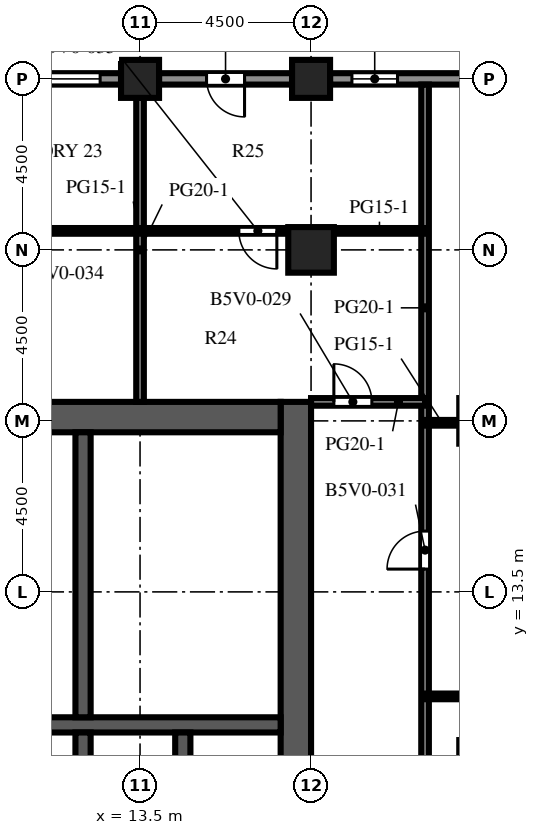
"""IFC4 building model, lengths in metres.
Left out: names, types, materials, properties, quantities, classifications, styles, units other than length and angle.
Written with IfcOpenShell. Run it as: python <this file> out.ifc"""

import sys

from ifc_helpers import new_model, si_unit, direction, frame, frame_2d, origin, origin_2d, place, context, subcontext, project, spatial, rectangle, extrude, element, fill, save


model = new_model("IFC4")
c1 = context("Model", 3, precision=1e-05, world=origin(), true_north=direction((0.0, 1.0)))
c2 = subcontext(c1, "Body", "Model", "MODEL_VIEW")
j1 = project(units=[si_unit("LENGTHUNIT", "METRE"), si_unit("PLANEANGLEUNIT", "RADIAN")], contexts=[c1])
p1 = place(None, origin())
s1 = spatial("IfcSite", under=j1, at=p1, CompositionType="ELEMENT")
p2 = place(p1, origin())
s2 = spatial("IfcBuilding", under=s1, at=p2, CompositionType="ELEMENT")
p3 = place(p2, frame((0.0, 0.0, 160.9)))
s3 = spatial("IfcBuildingStorey", under=s2, at=p3, CompositionType="ELEMENT", Elevation=160.9)
for number, where, z_axis, x_axis in (
    (1, (13.5, 27.0, 0.0), (0.0, 0.0, 1.0), (1.0, 0.0, 0.0)),
    (2, (18.0, 27.0, 0.0), (0.0, 0.0, 1.0), (1.0, 0.0, 0.0)),
):
    element("IfcColumn", number, at=place(p3, frame(where, z_axis=z_axis, x_axis=x_axis)), inside=s3, PredefinedType="COLUMN", context=c2, shape_type="SweptSolid", body=[
        extrude(rectangle(XDim=1.0, YDim=1.0, at=origin_2d()), origin(), (0.0, 0.0, 1.0), 4.1),
    ])
p4 = place(p3, frame((18.0, 22.5, 0.0), z_axis=(0.0, 0.0, 1.0), x_axis=(1.0, 0.0, 0.0)))
e3 = element("IfcColumn", 3, at=p4, inside=s3, PredefinedType="COLUMN", context=c2, shape_type="SweptSolid", body=[
    extrude(rectangle(XDim=1.2, YDim=1.2, at=origin_2d()), origin(), (0.0, 0.0, 1.0), 4.1),
])
p5 = place(p3, frame((17.6, -9.0, 0.0), z_axis=(0.0, 0.0, 1.0), x_axis=(0.0, 1.0, 0.0)))
e4 = element("IfcWall", 4, at=p5, inside=s3, PredefinedType="SHEAR", context=c2, shape_type="SweptSolid", body=[
    extrude(rectangle(XDim=27.5, YDim=0.8, at=frame_2d((13.75, 0.0))), origin(), (0.0, 0.0, 1.0), 4.1),
])
p6 = place(p5, frame((12.55, 0.0, 0.0)))
e5 = element("IfcOpeningElement", 5, at=p6, cuts=e4, PredefinedType="OPENING", context=c2, shape_type="SweptSolid", body=[
    extrude(rectangle(XDim=2.4, YDim=2.4, at=frame_2d((1.2, 1.2))), frame((0.0, 0.41, 0.0), z_axis=(0.0, -1.0, 0.0), x_axis=(1.0, 0.0, 0.0)), (0.0, 0.0, 1.0), 0.82),
])
p7 = place(p5, frame((6.825, 0.0, 0.0)))
e6 = element("IfcOpeningElement", 6, at=p7, cuts=e4, PredefinedType="OPENING", context=c2, shape_type="SweptSolid", body=[
    extrude(rectangle(XDim=1.2, YDim=2.1, at=frame_2d((0.6, 1.05))), frame((0.0, 0.41, 0.0), z_axis=(0.0, -1.0, 0.0), x_axis=(1.0, 0.0, 0.0)), (0.0, 0.0, 1.0), 0.82),
])
p8 = place(p5, frame((19.475, 0.0, 0.0)))
e7 = element("IfcOpeningElement", 7, at=p8, cuts=e4, PredefinedType="OPENING", context=c2, shape_type="SweptSolid", body=[
    extrude(rectangle(XDim=1.2, YDim=2.1, at=frame_2d((0.6, 1.05))), frame((0.0, 0.41, 0.0), z_axis=(0.0, -1.0, 0.0), x_axis=(1.0, 0.0, 0.0)), (0.0, 0.0, 1.0), 0.82),
])
p9 = place(p3, frame((6.8, 18.1, 0.0), z_axis=(0.0, 0.0, 1.0), x_axis=(1.0, 0.0, 0.0)))
e8 = element("IfcWall", 8, at=p9, inside=s3, PredefinedType="SHEAR", context=c2, shape_type="SweptSolid", body=[
    extrude(rectangle(XDim=10.4, YDim=0.8, at=frame_2d((5.2, 0.0))), origin(), (0.0, 0.0, 1.0), 4.1),
])
p10 = place(p3, frame((6.8, 10.0, 0.0), z_axis=(0.0, 0.0, 1.0), x_axis=(1.0, 0.0, 0.0)))
e9 = element("IfcWall", 9, at=p10, inside=s3, PredefinedType="SHEAR", context=c2, shape_type="SweptSolid", body=[
    extrude(rectangle(XDim=10.4, YDim=0.4, at=frame_2d((5.2, 0.0))), origin(), (0.0, 0.0, 1.0), 4.1),
])
for number, where, z_axis, x_axis in (
    (10, (12.0, 6.9, 0.0), (0.0, 0.0, 1.0), (0.0, 1.0, 0.0)),
    (11, (14.625, 6.9, 0.0), (0.0, 0.0, 1.0), (0.0, 1.0, 0.0)),
):
    element("IfcWall", number, at=place(p3, frame(where, z_axis=z_axis, x_axis=x_axis)), inside=s3, PredefinedType="SHEAR", context=c2, shape_type="SweptSolid", body=[
        extrude(rectangle(XDim=2.9, YDim=0.4, at=frame_2d((1.45, 0.0))), origin(), (0.0, 0.0, 1.0), 4.1),
    ])
p11 = place(p3, frame((12.0, 10.2, 0.0), z_axis=(0.0, 0.0, 1.0), x_axis=(0.0, 1.0, 0.0)))
e12 = element("IfcWall", 12, at=p11, inside=s3, PredefinedType="SHEAR", context=c2, shape_type="SweptSolid", body=[
    extrude(rectangle(XDim=7.5, YDim=0.4, at=frame_2d((3.75, 0.0))), origin(), (0.0, 0.0, 1.0), 4.1),
])
p12 = place(p3, frame((18.5, 27.0, 0.0), z_axis=(0.0, 0.0, 1.0), x_axis=(1.0, 0.0, 0.0)))
e13 = element("IfcWall", 13, at=p12, inside=s3, PredefinedType="SOLIDWALL", context=c2, shape_type="SweptSolid", body=[
    extrude(rectangle(XDim=3.5, YDim=0.3, at=frame_2d((1.75, 0.0))), origin(), (0.0, 0.0, 1.0), 2.85),
])
p13 = place(p12, frame((0.575, 0.0, 0.8)))
e14 = element("IfcOpeningElement", 14, at=p13, cuts=e13, PredefinedType="OPENING", context=c2, shape_type="SweptSolid", body=[
    extrude(rectangle(XDim=1.2, YDim=1.7, at=frame_2d((0.6, 0.85))), frame((0.0, 0.16, 0.0), z_axis=(0.0, -1.0, 0.0), x_axis=(1.0, 0.0, 0.0)), (0.0, 0.0, 1.0), 0.32),
])
p14 = place(p3, frame((14.0, 27.0, 0.0), z_axis=(0.0, 0.0, 1.0), x_axis=(1.0, 0.0, 0.0)))
e15 = element("IfcWall", 15, at=p14, inside=s3, PredefinedType="SOLIDWALL", context=c2, shape_type="SweptSolid", body=[
    extrude(rectangle(XDim=3.5, YDim=0.3, at=frame_2d((1.75, 0.0))), origin(), (0.0, 0.0, 1.0), 2.85),
])
p15 = place(p14, frame((1.25, 0.0, 0.0)))
e16 = element("IfcOpeningElement", 16, at=p15, cuts=e15, PredefinedType="OPENING", context=c2, shape_type="SweptSolid", body=[
    extrude(rectangle(XDim=1.0, YDim=2.2, at=frame_2d((0.5, 1.1))), frame((0.0, 0.16, 0.0), z_axis=(0.0, -1.0, 0.0), x_axis=(1.0, 0.0, 0.0)), (0.0, 0.0, 1.0), 0.32),
])
p16 = place(p3, frame((9.5, 27.0, 0.0), z_axis=(0.0, 0.0, 1.0), x_axis=(1.0, 0.0, 0.0)))
e17 = element("IfcWall", 17, at=p16, inside=s3, PredefinedType="SOLIDWALL", context=c2, shape_type="SweptSolid", body=[
    extrude(rectangle(XDim=3.5, YDim=0.3, at=frame_2d((1.75, 0.0))), origin(), (0.0, 0.0, 1.0), 2.85),
])
p17 = place(p16, frame((0.55, 0.0, 0.8)))
e18 = element("IfcOpeningElement", 18, at=p17, cuts=e17, PredefinedType="OPENING", context=c2, shape_type="SweptSolid", body=[
    extrude(rectangle(XDim=2.4, YDim=1.7, at=frame_2d((1.2, 0.85))), frame((0.0, 0.16, 0.0), z_axis=(0.0, -1.0, 0.0), x_axis=(1.0, 0.0, 0.0)), (0.0, 0.0, 1.0), 0.32),
])
for number, where, z_axis, x_axis in (
    (19, (6.8, 11.7, 0.0), (0.0, 0.0, 1.0), (1.0, 0.0, 0.0)),
    (20, (6.8, 13.575, 0.0), (0.0, 0.0, 1.0), (1.0, 0.0, 0.0)),
    (21, (6.8, 15.825, 0.0), (0.0, 0.0, 1.0), (1.0, 0.0, 0.0)),
):
    element("IfcWall", number, at=place(p3, frame(where, z_axis=z_axis, x_axis=x_axis)), inside=s3, PredefinedType="PARTITIONING", context=c2, shape_type="SweptSolid", body=[
        extrude(rectangle(XDim=5.0, YDim=0.1, at=frame_2d((2.5, 0.0))), origin(), (0.0, 0.0, 1.0), 3.65),
    ])
p18 = place(p3, frame((13.5, 18.5, 0.0), z_axis=(0.0, 0.0, 1.0), x_axis=(0.0, 1.0, 0.0)))
e22 = element("IfcWall", 22, at=p18, inside=s3, PredefinedType="PARTITIONING", context=c2, shape_type="SweptSolid", body=[
    extrude(rectangle(XDim=8.0, YDim=0.2, at=frame_2d((4.0, 0.0))), origin(), (0.0, 0.0, 1.0), 3.65),
])
p19 = place(p3, frame((21.0, 26.85, 0.0), z_axis=(0.0, 0.0, 1.0), x_axis=(0.0, -1.0, 0.0)))
e23 = element("IfcWall", 23, at=p19, inside=s3, PredefinedType="PARTITIONING", context=c2, shape_type="SweptSolid", body=[
    extrude(rectangle(XDim=20.6, YDim=0.2, at=frame_2d((10.3, 0.0))), origin(), (0.0, 0.0, 1.0), 3.65),
])
p20 = place(p19, frame((11.75, 0.0, 0.0)))
e24 = element("IfcOpeningElement", 24, at=p20, cuts=e23, PredefinedType="OPENING", context=c2, shape_type="SweptSolid", body=[
    extrude(rectangle(XDim=1.0, YDim=2.1, at=frame_2d((0.5, 1.05))), frame((0.0, 0.11, 0.0), z_axis=(0.0, -1.0, 0.0), x_axis=(1.0, 0.0, 0.0)), (0.0, 0.0, 1.0), 0.22),
])
p21 = place(p3, frame((26.85, 10.75, 0.0), z_axis=(0.0, 0.0, 1.0), x_axis=(-1.0, 0.0, 0.0)))
e25 = element("IfcWall", 25, at=p21, inside=s3, PredefinedType="PARTITIONING", context=c2, shape_type="SweptSolid", body=[
    extrude(rectangle(XDim=5.85, YDim=0.15, at=frame_2d((2.925, 0.0))), origin(), (0.0, 0.0, 1.0), 3.65),
])
p22 = place(p21, frame((2.5, 0.0, 0.0)))
e26 = element("IfcOpeningElement", 26, at=p22, cuts=e25, PredefinedType="OPENING", context=c2, shape_type="SweptSolid", body=[
    extrude(rectangle(XDim=1.0, YDim=2.1, at=frame_2d((0.5, 1.05))), frame((0.0, 0.085, 0.0), z_axis=(0.0, -1.0, 0.0), x_axis=(1.0, 0.0, 0.0)), (0.0, 0.0, 1.0), 0.17),
])
p23 = place(p3, frame((21.0, 17.95, 0.0), z_axis=(0.0, 0.0, 1.0), x_axis=(1.0, 0.0, 0.0)))
e27 = element("IfcWall", 27, at=p23, inside=s3, PredefinedType="PARTITIONING", context=c2, shape_type="SweptSolid", body=[
    extrude(rectangle(XDim=0.9, YDim=0.15, at=frame_2d((0.45, 0.0))), origin(), (0.0, 0.0, 1.0), 3.65),
])
p24 = place(p3, frame((18.0, 18.5, 0.0), z_axis=(0.0, 0.0, 1.0), x_axis=(1.0, 0.0, 0.0)))
e28 = element("IfcWall", 28, at=p24, inside=s3, PredefinedType="PARTITIONING", context=c2, shape_type="SweptSolid", body=[
    extrude(rectangle(XDim=3.0, YDim=0.2, at=frame_2d((1.5, 0.0))), origin(), (0.0, 0.0, 1.0), 3.65),
])
p25 = place(p24, frame((0.6, 0.0, 0.0)))
e29 = element("IfcOpeningElement", 29, at=p25, cuts=e28, PredefinedType="OPENING", context=c2, shape_type="SweptSolid", body=[
    extrude(rectangle(XDim=1.0, YDim=2.1, at=frame_2d((0.5, 1.05))), frame((0.0, 0.11, 0.0), z_axis=(0.0, -1.0, 0.0), x_axis=(1.0, 0.0, 0.0)), (0.0, 0.0, 1.0), 0.22),
])
p26 = place(p3, frame((9.6, 23.0, 0.0), z_axis=(0.0, 0.0, 1.0), x_axis=(1.0, 0.0, 0.0)))
e30 = element("IfcWall", 30, at=p26, inside=s3, PredefinedType="PARTITIONING", context=c2, shape_type="SweptSolid", body=[
    extrude(rectangle(XDim=7.8, YDim=0.15, at=frame_2d((3.9, 0.0))), origin(), (0.0, 0.0, 1.0), 3.65),
])
p27 = place(p26, frame((0.25, 0.0, 0.0)))
e31 = element("IfcOpeningElement", 31, at=p27, cuts=e30, PredefinedType="OPENING", context=c2, shape_type="SweptSolid", body=[
    extrude(rectangle(XDim=1.0, YDim=2.1, at=frame_2d((0.5, 1.05))), frame((0.0, 0.085, 0.0), z_axis=(0.0, -1.0, 0.0), x_axis=(1.0, 0.0, 0.0)), (0.0, 0.0, 1.0), 0.17),
])
p28 = place(p26, frame((6.5, 0.0, 0.0)))
e32 = element("IfcOpeningElement", 32, at=p28, cuts=e30, PredefinedType="OPENING", context=c2, shape_type="SweptSolid", body=[
    extrude(rectangle(XDim=1.0, YDim=2.1, at=frame_2d((0.5, 1.05))), frame((0.0, 0.085, 0.0), z_axis=(0.0, -1.0, 0.0), x_axis=(1.0, 0.0, 0.0)), (0.0, 0.0, 1.0), 0.17),
])
p29 = place(p3, frame((18.6, 23.0, 0.0), z_axis=(0.0, 0.0, 1.0), x_axis=(1.0, 0.0, 0.0)))
e33 = element("IfcWall", 33, at=p29, inside=s3, PredefinedType="PARTITIONING", context=c2, shape_type="SweptSolid", body=[
    extrude(rectangle(XDim=2.4, YDim=0.15, at=frame_2d((1.2, 0.0))), origin(), (0.0, 0.0, 1.0), 3.65),
])
p30 = place(p13, origin())
e34 = element("IfcWindow", 34, at=p30, inside=s3, PartitioningType="SINGLE_PANEL", PredefinedType="WINDOW", context=c2, shape_type="SweptSolid", body=[
    extrude(rectangle(XDim=1.2, YDim=1.7, at=frame_2d((0.6, 0.85))), frame((0.0, 0.03, 0.0), z_axis=(0.0, -1.0, 0.0), x_axis=(1.0, 0.0, 0.0)), (0.0, 0.0, 1.0), 0.06),
])
fill(e14, e34)
p31 = place(p15, origin())
e35 = element("IfcDoor", 35, at=p31, inside=s3, OperationType="SINGLE_SWING_RIGHT", PredefinedType="DOOR", context=c2, shape_type="SweptSolid", body=[
    extrude(rectangle(XDim=1.0, YDim=2.2, at=frame_2d((0.5, 1.1))), frame((0.0, 0.025, 0.0), z_axis=(0.0, -1.0, 0.0), x_axis=(1.0, 0.0, 0.0)), (0.0, 0.0, 1.0), 0.05),
])
fill(e16, e35)
p32 = place(p17, origin())
e36 = element("IfcWindow", 36, at=p32, inside=s3, PartitioningType="SINGLE_PANEL", PredefinedType="WINDOW", context=c2, shape_type="SweptSolid", body=[
    extrude(rectangle(XDim=2.4, YDim=1.7, at=frame_2d((1.2, 0.85))), frame((0.0, 0.03, 0.0), z_axis=(0.0, -1.0, 0.0), x_axis=(1.0, 0.0, 0.0)), (0.0, 0.0, 1.0), 0.06),
])
fill(e18, e36)
p33 = place(p8, frame((1.2, 0.0, 0.0), z_axis=(0.0, 0.0, 1.0), x_axis=(-1.0, 0.0, 0.0)))
e37 = element("IfcDoor", 37, at=p33, inside=s3, OperationType="SINGLE_SWING_LEFT", PredefinedType="DOOR", context=c2, shape_type="SweptSolid", body=[
    extrude(rectangle(XDim=1.2, YDim=2.1, at=frame_2d((0.6, 1.05))), frame((0.0, 0.025, 0.0), z_axis=(0.0, -1.0, 0.0), x_axis=(1.0, 0.0, 0.0)), (0.0, 0.0, 1.0), 0.05),
])
fill(e7, e37)
p34 = place(p25, origin())
e38 = element("IfcDoor", 38, at=p34, inside=s3, OperationType="SINGLE_SWING_LEFT", PredefinedType="DOOR", context=c2, shape_type="SweptSolid", body=[
    extrude(rectangle(XDim=1.0, YDim=2.1, at=frame_2d((0.5, 1.05))), frame((0.0, 0.025, 0.0), z_axis=(0.0, -1.0, 0.0), x_axis=(1.0, 0.0, 0.0)), (0.0, 0.0, 1.0), 0.05),
])
fill(e29, e38)
p35 = place(p20, origin())
e39 = element("IfcDoor", 39, at=p35, inside=s3, OperationType="SINGLE_SWING_RIGHT", PredefinedType="DOOR", context=c2, shape_type="SweptSolid", body=[
    extrude(rectangle(XDim=1.0, YDim=2.1, at=frame_2d((0.5, 1.05))), frame((0.0, 0.025, 0.0), z_axis=(0.0, -1.0, 0.0), x_axis=(1.0, 0.0, 0.0)), (0.0, 0.0, 1.0), 0.05),
])
fill(e24, e39)
p36 = place(p28, origin())
e40 = element("IfcDoor", 40, at=p36, inside=s3, OperationType="SINGLE_SWING_RIGHT", PredefinedType="DOOR", context=c2, shape_type="SweptSolid", body=[
    extrude(rectangle(XDim=1.0, YDim=2.1, at=frame_2d((0.5, 1.05))), frame((0.0, 0.025, 0.0), z_axis=(0.0, -1.0, 0.0), x_axis=(1.0, 0.0, 0.0)), (0.0, 0.0, 1.0), 0.05),
])
fill(e32, e40)
save(model, sys.argv[1])
